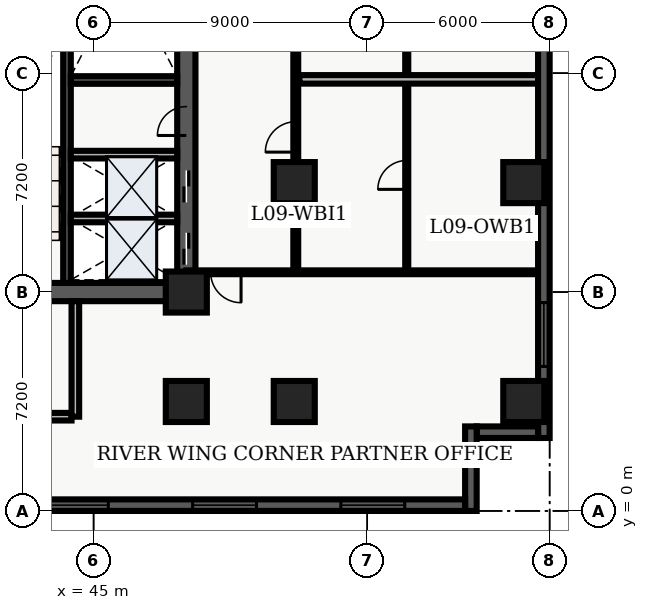
"""IFC4 building model, lengths in metres.
Left out: names, types, materials, properties, quantities, classifications, styles, units other than length and angle.
Written with IfcOpenShell. Run it as: python <this file> out.ifc"""

import sys

from ifc_helpers import new_model, entity, si_unit, converted_unit, direction, frame, origin_with_axes, origin_2d_with_axis, place, context, subcontext, project, spatial, polyline, rectangle, outline, extrude, element, fill, save


model = new_model("IFC4")
c1 = context("Model", 3, precision=1e-05, world=origin_with_axes(), true_north=direction((0.0, 1.0)))
c2 = subcontext(c1, "Body", "Model", "MODEL_VIEW")
j1 = project(units=[si_unit("LENGTHUNIT", "METRE"), converted_unit("PLANEANGLEUNIT", "DEGREE", entity("IfcPlaneAngleMeasure", 0.017), si_unit("PLANEANGLEUNIT", "RADIAN"), dimensions=[0, 0, 0, 0, 0, 0, 0])], contexts=[c1])
p1 = place(None, origin_with_axes())
s1 = spatial("IfcSite", under=j1, at=p1, CompositionType="ELEMENT")
p2 = place(p1, origin_with_axes())
s2 = spatial("IfcBuilding", under=s1, at=p2, CompositionType="ELEMENT")
p3 = place(p2, frame((0.0, 0.0, 40.5), z_axis=(0.0, 0.0, 1.0), x_axis=(1.0, 0.0, 0.0)))
s3 = spatial("IfcBuildingStorey", under=s2, at=p3, CompositionType="ELEMENT", Elevation=40.5)
p4 = place(p3, frame((40.2, 7.2, 0.0), z_axis=(0.0, 0.0, 1.0), x_axis=(1.0, 0.0, 0.0)))
e1 = element("IfcWall", 1, at=p4, inside=s3, PredefinedType="SHEAR", context=c2, shape_type="SweptSolid", body=[
    extrude(outline(polyline([(0.0, -0.3), (7.85, -0.3), (7.85, 0.3), (0.0, 0.3), (0.0, -0.3)])), origin_with_axes(), (0.0, 0.0, 1.0), 3.66),
])
p5 = place(p4, frame((2.175, 0.0, 0.0), z_axis=(0.0, 0.0, 1.0), x_axis=(1.0, 0.0, 0.0)))
e2 = element("IfcOpeningElement", 2, at=p5, cuts=e1, PredefinedType="OPENING", context=c2, shape_type="SweptSolid", body=[
    extrude(rectangle(XDim=1.05, YDim=0.62, at=origin_2d_with_axis()), origin_with_axes(), (0.0, 0.0, 1.0), 2.15),
])
p6 = place(p3, frame((48.05, 7.2, 0.0), z_axis=(0.0, 0.0, 1.0), x_axis=(0.0, 1.0, 0.0)))
e3 = element("IfcWall", 3, at=p6, inside=s3, PredefinedType="SHEAR", context=c2, shape_type="SweptSolid", body=[
    extrude(outline(polyline([(0.0, -0.3), (15.6, -0.3), (15.6, 0.3), (0.0, 0.3), (0.0, -0.3)])), origin_with_axes(), (0.0, 0.0, 1.0), 3.66),
])
p7 = place(p6, frame((1.425, 0.0, 0.0), z_axis=(0.0, 0.0, 1.0), x_axis=(1.0, 0.0, 0.0)))
e4 = element("IfcOpeningElement", 4, at=p7, cuts=e3, PredefinedType="OPENING", context=c2, shape_type="SweptSolid", body=[
    extrude(rectangle(XDim=1.05, YDim=0.62, at=origin_2d_with_axis()), origin_with_axes(), (0.0, 0.0, 1.0), 2.15),
])
p8 = place(p6, frame((3.475, 0.0, 0.0), z_axis=(0.0, 0.0, 1.0), x_axis=(1.0, 0.0, 0.0)))
e5 = element("IfcOpeningElement", 5, at=p8, cuts=e3, PredefinedType="OPENING", context=c2, shape_type="SweptSolid", body=[
    extrude(rectangle(XDim=1.05, YDim=0.62, at=origin_2d_with_axis()), origin_with_axes(), (0.0, 0.0, 1.0), 2.15),
])
p9 = place(p6, frame((5.625, 0.0, 0.0), z_axis=(0.0, 0.0, 1.0), x_axis=(1.0, 0.0, 0.0)))
e6 = element("IfcOpeningElement", 6, at=p9, cuts=e3, PredefinedType="OPENING", context=c2, shape_type="SweptSolid", body=[
    extrude(rectangle(XDim=0.95, YDim=0.62, at=origin_2d_with_axis()), origin_with_axes(), (0.0, 0.0, 1.0), 2.15),
])
p10 = place(p3, frame((44.125, 7.5, 0.0), z_axis=(0.0, 0.0, 1.0), x_axis=(0.0, 1.0, 0.0)))
e7 = element("IfcWall", 7, at=p10, inside=s3, PredefinedType="SHEAR", context=c2, shape_type="SweptSolid", body=[
    extrude(outline(polyline([(0.0, -0.125), (15.0, -0.125), (15.0, 0.125), (0.0, 0.125), (0.0, -0.125)])), origin_with_axes(), (0.0, 0.0, 1.0), 3.66),
])
p11 = place(p3, frame((44.25, 14.175, 0.0), z_axis=(0.0, 0.0, 1.0), x_axis=(1.0, 0.0, 0.0)))
e8 = element("IfcWall", 8, at=p11, inside=s3, PredefinedType="SHEAR", context=c2, shape_type="SweptSolid", body=[
    extrude(outline(polyline([(0.0, -0.125), (3.5, -0.125), (3.5, 0.125), (0.0, 0.125), (0.0, -0.125)])), origin_with_axes(), (0.0, 0.0, 1.0), 3.66),
])
p12 = place(p3, frame((40.325, 3.1, 0.0), z_axis=(0.0, 0.0, 1.0), x_axis=(1.0, 0.0, 0.0)))
e9 = element("IfcWall", 9, at=p12, inside=s3, PredefinedType="SOLIDWALL", context=c2, shape_type="SweptSolid", body=[
    extrude(outline(polyline([(0.0, -0.125), (3.95, -0.125), (3.95, 0.125), (0.0, 0.125), (0.0, -0.125)])), origin_with_axes(), (0.0, 0.0, 1.0), 2.7),
])
p13 = place(p3, frame((44.4, 3.1, 0.0), z_axis=(0.0, 0.0, 1.0), x_axis=(0.0, 1.0, 0.0)))
e10 = element("IfcWall", 10, at=p13, inside=s3, PredefinedType="SOLIDWALL", context=c2, shape_type="SweptSolid", body=[
    extrude(outline(polyline([(0.0, -0.125), (3.8, -0.125), (3.8, 0.125), (0.0, 0.125), (0.0, -0.125)])), origin_with_axes(), (0.0, 0.0, 1.0), 2.7),
])
for number, where, z_axis, x_axis in (
    (11, (48.05, 3.6, 0.0), (0.0, 0.0, 1.0), (1.0, 0.0, 0.0)),
    (12, (48.05, 7.2, 0.0), (0.0, 0.0, 1.0), (1.0, 0.0, 0.0)),
    (13, (51.6, 3.6, 0.0), (0.0, 0.0, 1.0), (1.0, 0.0, 0.0)),
    (14, (51.6, 10.8, 0.0), (0.0, 0.0, 1.0), (1.0, 0.0, 0.0)),
    (15, (59.15, 3.6, 0.0), (0.0, 0.0, 1.0), (1.0, 0.0, 0.0)),
    (16, (59.15, 10.8, 0.0), (0.0, 0.0, 1.0), (1.0, 0.0, 0.0)),
):
    element("IfcColumn", number, at=place(p3, frame(where, z_axis=z_axis, x_axis=x_axis)), inside=s3, PredefinedType="COLUMN", context=c2, shape_type="SweptSolid", body=[
        extrude(rectangle(XDim=1.35, YDim=1.35, at=origin_2d_with_axis()), origin_with_axes(), (0.0, 0.0, 1.0), 3.9),
    ])
for number, where, z_axis, x_axis in (
    (17, (44.25, 9.62, 0.0), (0.0, 0.0, 1.0), (1.0, 0.0, 0.0)),
    (18, (44.25, 11.72, 0.0), (0.0, 0.0, 1.0), (1.0, 0.0, 0.0)),
):
    element("IfcWall", number, at=place(p3, frame(where, z_axis=z_axis, x_axis=x_axis)), inside=s3, PredefinedType="SOLIDWALL", context=c2, shape_type="SweptSolid", body=[
        extrude(outline(polyline([(0.0, -0.125), (3.5, -0.125), (3.5, 0.125), (0.0, 0.125), (0.0, -0.125)])), origin_with_axes(), (0.0, 0.0, 1.0), 2.7),
    ])
p14 = place(p3, frame((51.65, 7.85, 0.0), z_axis=(0.0, 0.0, 1.0), x_axis=(0.0, 1.0, 0.0)))
e19 = element("IfcWall", 19, at=p14, inside=s3, PredefinedType="PARTITIONING", context=c2, shape_type="SweptSolid", body=[
    extrude(outline(polyline([(0.0, -0.08), (18.8, -0.08), (18.8, 0.08), (0.0, 0.08), (0.0, -0.08)])), origin_with_axes(), (0.0, 0.0, 1.0), 2.7),
])
p15 = place(p14, frame((4.453, 0.0, 0.0), z_axis=(0.0, 0.0, 1.0), x_axis=(1.0, 0.0, 0.0)))
e20 = element("IfcOpeningElement", 20, at=p15, cuts=e19, PredefinedType="OPENING", context=c2, shape_type="SweptSolid", body=[
    extrude(rectangle(XDim=1.0, YDim=0.18, at=origin_2d_with_axis()), origin_with_axes(), (0.0, 0.0, 1.0), 2.15),
])
p16 = place(p14, frame((7.831, 0.0, 0.0), z_axis=(0.0, 0.0, 1.0), x_axis=(1.0, 0.0, 0.0)))
e21 = element("IfcOpeningElement", 21, at=p16, cuts=e19, PredefinedType="OPENING", context=c2, shape_type="SweptSolid", body=[
    extrude(rectangle(XDim=1.0, YDim=0.18, at=origin_2d_with_axis()), origin_with_axes(), (0.0, 0.0, 1.0), 2.15),
])
p17 = place(p14, frame((11.898, 0.0, 0.0), z_axis=(0.0, 0.0, 1.0), x_axis=(1.0, 0.0, 0.0)))
e22 = element("IfcOpeningElement", 22, at=p17, cuts=e19, PredefinedType="OPENING", context=c2, shape_type="SweptSolid", body=[
    extrude(rectangle(XDim=1.0, YDim=0.18, at=origin_2d_with_axis()), origin_with_axes(), (0.0, 0.0, 1.0), 2.15),
])
p18 = place(p14, frame((17.98, 0.0, 0.0), z_axis=(0.0, 0.0, 1.0), x_axis=(1.0, 0.0, 0.0)))
e23 = element("IfcOpeningElement", 23, at=p18, cuts=e19, PredefinedType="OPENING", context=c2, shape_type="SweptSolid", body=[
    extrude(rectangle(XDim=1.0, YDim=0.18, at=origin_2d_with_axis()), origin_with_axes(), (0.0, 0.0, 1.0), 2.15),
])
p19 = place(p3, frame((59.64, 7.85, 0.0), z_axis=(0.0, 0.0, 1.0), x_axis=(-1.0, 0.0, 0.0)))
e24 = element("IfcWall", 24, at=p19, inside=s3, PredefinedType="PARTITIONING", context=c2, shape_type="SweptSolid", body=[
    extrude(outline(polyline([(0.0, -0.062), (11.59, -0.062), (11.59, 0.062), (0.0, 0.062), (0.0, -0.062)])), origin_with_axes(), (0.0, 0.0, 1.0), 2.7),
])
p20 = place(p19, frame((10.29, 0.0, 0.0), z_axis=(0.0, 0.0, 1.0), x_axis=(1.0, 0.0, 0.0)))
e25 = element("IfcOpeningElement", 25, at=p20, cuts=e24, PredefinedType="OPENING", context=c2, shape_type="SweptSolid", body=[
    extrude(rectangle(XDim=1.0, YDim=0.145, at=origin_2d_with_axis()), origin_with_axes(), (0.0, 0.0, 1.0), 2.15),
])
p21 = place(p3, frame((55.3, 7.98, 0.0), z_axis=(0.0, 0.0, 1.0), x_axis=(0.0, 1.0, 0.0)))
e26 = element("IfcWall", 26, at=p21, inside=s3, PredefinedType="PARTITIONING", context=c2, shape_type="SweptSolid", body=[
    extrude(outline(polyline([(0.0, -0.05), (18.54, -0.05), (18.54, 0.05), (0.0, 0.05), (0.0, -0.05)])), origin_with_axes(), (0.0, 0.0, 1.0), 2.7),
])
p22 = place(p21, frame((3.073, 0.0, 0.0), z_axis=(0.0, 0.0, 1.0), x_axis=(1.0, 0.0, 0.0)))
e27 = element("IfcOpeningElement", 27, at=p22, cuts=e26, PredefinedType="OPENING", context=c2, shape_type="SweptSolid", body=[
    extrude(rectangle(XDim=0.95, YDim=0.12, at=origin_2d_with_axis()), origin_with_axes(), (0.0, 0.0, 1.0), 2.15),
])
p23 = place(p21, frame((7.981, 0.0, 0.0), z_axis=(0.0, 0.0, 1.0), x_axis=(1.0, 0.0, 0.0)))
e28 = element("IfcOpeningElement", 28, at=p23, cuts=e26, PredefinedType="OPENING", context=c2, shape_type="SweptSolid", body=[
    extrude(rectangle(XDim=0.95, YDim=0.12, at=origin_2d_with_axis()), origin_with_axes(), (0.0, 0.0, 1.0), 2.15),
])
p24 = place(p21, frame((11.768, 0.0, 0.0), z_axis=(0.0, 0.0, 1.0), x_axis=(1.0, 0.0, 0.0)))
e29 = element("IfcOpeningElement", 29, at=p24, cuts=e26, PredefinedType="OPENING", context=c2, shape_type="SweptSolid", body=[
    extrude(rectangle(XDim=0.95, YDim=0.12, at=origin_2d_with_axis()), origin_with_axes(), (0.0, 0.0, 1.0), 2.15),
])
p25 = place(p21, frame((16.201, 0.0, 0.0), z_axis=(0.0, 0.0, 1.0), x_axis=(1.0, 0.0, 0.0)))
e30 = element("IfcOpeningElement", 30, at=p25, cuts=e26, PredefinedType="OPENING", context=c2, shape_type="SweptSolid", body=[
    extrude(rectangle(XDim=0.95, YDim=0.12, at=origin_2d_with_axis()), origin_with_axes(), (0.0, 0.0, 1.0), 2.15),
])
p26 = place(p3, frame((51.77, 14.196, 0.0), z_axis=(0.0, 0.0, 1.0), x_axis=(1.0, 0.0, 0.0)))
e31 = element("IfcWall", 31, at=p26, inside=s3, PredefinedType="PARTITIONING", context=c2, shape_type="SweptSolid", body=[
    extrude(outline(polyline([(0.0, -0.14), (7.855, -0.14), (7.855, 0.14), (0.0, 0.14), (0.0, -0.14)])), origin_with_axes(), (0.0, 0.0, 1.0), 2.7),
])
p27 = place(p3, frame((59.81, 26.02, 0.0), z_axis=(0.0, 0.0, 1.0), x_axis=(0.0, -1.0, 0.0)))
e32 = element("IfcWall", 32, at=p27, inside=s3, PredefinedType="SOLIDWALL", context=c2, shape_type="SweptSolid", body=[
    extrude(outline(polyline([(0.0, -0.19), (23.62, -0.19), (23.62, 0.19), (0.0, 0.19), (0.0, -0.19)])), origin_with_axes(), (0.0, 0.0, 1.0), 3.66),
])
p28 = place(p27, frame((20.218, 0.0, 0.45), z_axis=(0.0, 0.0, 1.0), x_axis=(1.0, 0.0, 0.0)))
e33 = element("IfcOpeningElement", 33, at=p28, cuts=e32, PredefinedType="OPENING", context=c2, shape_type="SweptSolid", body=[
    extrude(rectangle(XDim=2.1, YDim=0.4, at=origin_2d_with_axis()), origin_with_axes(), (0.0, 0.0, 1.0), 2.2),
])
p29 = place(p3, frame((59.62, 2.59, 0.0), z_axis=(0.0, 0.0, 1.0), x_axis=(-1.0, 0.0, 0.0)))
e34 = element("IfcWall", 34, at=p29, inside=s3, PredefinedType="SOLIDWALL", context=c2, shape_type="SweptSolid", body=[
    extrude(outline(polyline([(0.0, -0.19), (2.02, -0.19), (2.02, 0.19), (0.0, 0.19), (0.0, -0.19)])), origin_with_axes(), (0.0, 0.0, 1.0), 3.66),
])
p30 = place(p3, frame((57.41, 2.78, 0.0), z_axis=(0.0, 0.0, 1.0), x_axis=(0.0, -1.0, 0.0)))
e35 = element("IfcWall", 35, at=p30, inside=s3, PredefinedType="SOLIDWALL", context=c2, shape_type="SweptSolid", body=[
    extrude(outline(polyline([(0.0, -0.19), (2.78, -0.19), (2.78, 0.19), (0.0, 0.19), (0.0, -0.19)])), origin_with_axes(), (0.0, 0.0, 1.0), 3.66),
])
p31 = place(p3, frame((57.22, 0.19, 0.0), z_axis=(0.0, 0.0, 1.0), x_axis=(-1.0, 0.0, 0.0)))
e36 = element("IfcWall", 36, at=p31, inside=s3, PredefinedType="SOLIDWALL", context=c2, shape_type="SweptSolid", body=[
    extrude(outline(polyline([(0.0, -0.19), (54.82, -0.19), (54.82, 0.19), (0.0, 0.19), (0.0, -0.19)])), origin_with_axes(), (0.0, 0.0, 1.0), 3.66),
])
p32 = place(p31, frame((3.037, 0.0, 0.45), z_axis=(0.0, 0.0, 1.0), x_axis=(1.0, 0.0, 0.0)))
e37 = element("IfcOpeningElement", 37, at=p32, cuts=e36, PredefinedType="OPENING", context=c2, shape_type="SweptSolid", body=[
    extrude(rectangle(XDim=2.1, YDim=0.4, at=origin_2d_with_axis()), origin_with_axes(), (0.0, 0.0, 1.0), 2.2),
])
p33 = place(p31, frame((7.912, 0.0, 0.45), z_axis=(0.0, 0.0, 1.0), x_axis=(1.0, 0.0, 0.0)))
e38 = element("IfcOpeningElement", 38, at=p33, cuts=e36, PredefinedType="OPENING", context=c2, shape_type="SweptSolid", body=[
    extrude(rectangle(XDim=2.1, YDim=0.4, at=origin_2d_with_axis()), origin_with_axes(), (0.0, 0.0, 1.0), 2.2),
])
p34 = place(p31, frame((12.786, 0.0, 0.45), z_axis=(0.0, 0.0, 1.0), x_axis=(1.0, 0.0, 0.0)))
e39 = element("IfcOpeningElement", 39, at=p34, cuts=e36, PredefinedType="OPENING", context=c2, shape_type="SweptSolid", body=[
    extrude(rectangle(XDim=2.1, YDim=0.4, at=origin_2d_with_axis()), origin_with_axes(), (0.0, 0.0, 1.0), 2.2),
])
p35 = place(p31, frame((17.661, 0.0, 0.45), z_axis=(0.0, 0.0, 1.0), x_axis=(1.0, 0.0, 0.0)))
e40 = element("IfcOpeningElement", 40, at=p35, cuts=e36, PredefinedType="OPENING", context=c2, shape_type="SweptSolid", body=[
    extrude(rectangle(XDim=2.1, YDim=0.4, at=origin_2d_with_axis()), origin_with_axes(), (0.0, 0.0, 1.0), 2.2),
])
p36 = place(p31, frame((22.535, 0.0, 0.45), z_axis=(0.0, 0.0, 1.0), x_axis=(1.0, 0.0, 0.0)))
e41 = element("IfcOpeningElement", 41, at=p36, cuts=e36, PredefinedType="OPENING", context=c2, shape_type="SweptSolid", body=[
    extrude(rectangle(XDim=2.1, YDim=0.4, at=origin_2d_with_axis()), origin_with_axes(), (0.0, 0.0, 1.0), 2.2),
])
p37 = place(p31, frame((27.41, 0.0, 0.45), z_axis=(0.0, 0.0, 1.0), x_axis=(1.0, 0.0, 0.0)))
e42 = element("IfcOpeningElement", 42, at=p37, cuts=e36, PredefinedType="OPENING", context=c2, shape_type="SweptSolid", body=[
    extrude(rectangle(XDim=2.1, YDim=0.4, at=origin_2d_with_axis()), origin_with_axes(), (0.0, 0.0, 1.0), 2.2),
])
p38 = place(p31, frame((32.285, 0.0, 0.45), z_axis=(0.0, 0.0, 1.0), x_axis=(1.0, 0.0, 0.0)))
e43 = element("IfcOpeningElement", 43, at=p38, cuts=e36, PredefinedType="OPENING", context=c2, shape_type="SweptSolid", body=[
    extrude(rectangle(XDim=2.1, YDim=0.4, at=origin_2d_with_axis()), origin_with_axes(), (0.0, 0.0, 1.0), 2.2),
])
p39 = place(p31, frame((37.159, 0.0, 0.45), z_axis=(0.0, 0.0, 1.0), x_axis=(1.0, 0.0, 0.0)))
e44 = element("IfcOpeningElement", 44, at=p39, cuts=e36, PredefinedType="OPENING", context=c2, shape_type="SweptSolid", body=[
    extrude(rectangle(XDim=2.1, YDim=0.4, at=origin_2d_with_axis()), origin_with_axes(), (0.0, 0.0, 1.0), 2.2),
])
p40 = place(p31, frame((41.584, 0.0, 0.45), z_axis=(0.0, 0.0, 1.0), x_axis=(1.0, 0.0, 0.0)))
e45 = element("IfcOpeningElement", 45, at=p40, cuts=e36, PredefinedType="OPENING", context=c2, shape_type="SweptSolid", body=[
    extrude(rectangle(XDim=2.1, YDim=0.4, at=origin_2d_with_axis()), origin_with_axes(), (0.0, 0.0, 1.0), 2.2),
])
p41 = place(p31, frame((46.908, 0.0, 0.45), z_axis=(0.0, 0.0, 1.0), x_axis=(1.0, 0.0, 0.0)))
e46 = element("IfcOpeningElement", 46, at=p41, cuts=e36, PredefinedType="OPENING", context=c2, shape_type="SweptSolid", body=[
    extrude(rectangle(XDim=2.1, YDim=0.4, at=origin_2d_with_axis()), origin_with_axes(), (0.0, 0.0, 1.0), 2.2),
])
p42 = place(p31, frame((51.783, 0.0, 0.45), z_axis=(0.0, 0.0, 1.0), x_axis=(1.0, 0.0, 0.0)))
e47 = element("IfcOpeningElement", 47, at=p42, cuts=e36, PredefinedType="OPENING", context=c2, shape_type="SweptSolid", body=[
    extrude(rectangle(XDim=2.1, YDim=0.4, at=origin_2d_with_axis()), origin_with_axes(), (0.0, 0.0, 1.0), 2.2),
])
p43 = place(p6, frame((1.425, 0.0, 0.0), z_axis=(0.0, 0.0, 1.0), x_axis=(1.0, 0.0, 0.0)))
e48 = element("IfcDoor", 48, at=p43, inside=s3, OperationType="SLIDING_TO_LEFT", PredefinedType="DOOR", context=c2, shape_type="SweptSolid", body=[
    extrude(rectangle(XDim=1.05, YDim=0.09, at=origin_2d_with_axis()), origin_with_axes(), (0.0, 0.0, 1.0), 2.15),
])
fill(e4, e48)
p44 = place(p6, frame((3.475, 0.0, 0.0), z_axis=(0.0, 0.0, 1.0), x_axis=(1.0, 0.0, 0.0)))
e49 = element("IfcDoor", 49, at=p44, inside=s3, OperationType="SLIDING_TO_RIGHT", PredefinedType="DOOR", context=c2, shape_type="SweptSolid", body=[
    extrude(rectangle(XDim=1.05, YDim=0.09, at=origin_2d_with_axis()), origin_with_axes(), (0.0, 0.0, 1.0), 2.15),
])
fill(e5, e49)
p45 = place(p6, frame((5.625, 0.0, 0.0), z_axis=(0.0, 0.0, 1.0), x_axis=(1.0, 0.0, 0.0)))
e50 = element("IfcDoor", 50, at=p45, inside=s3, OperationType="SINGLE_SWING_LEFT", PredefinedType="DOOR", context=c2, shape_type="SweptSolid", body=[
    extrude(rectangle(XDim=0.95, YDim=0.09, at=origin_2d_with_axis()), origin_with_axes(), (0.0, 0.0, 1.0), 2.15),
])
fill(e6, e50)
p46 = place(p19, frame((10.29, 0.0, 0.0), z_axis=(0.0, 0.0, 1.0), x_axis=(1.0, 0.0, 0.0)))
e51 = element("IfcDoor", 51, at=p46, inside=s3, OperationType="SINGLE_SWING_LEFT", PredefinedType="DOOR", context=c2, shape_type="SweptSolid", body=[
    extrude(rectangle(XDim=1.0, YDim=0.075, at=origin_2d_with_axis()), origin_with_axes(), (0.0, 0.0, 1.0), 2.15),
])
fill(e25, e51)
p47 = place(p21, frame((3.073, 0.0, 0.0), z_axis=(0.0, 0.0, 1.0), x_axis=(1.0, 0.0, 0.0)))
e52 = element("IfcDoor", 52, at=p47, inside=s3, OperationType="SINGLE_SWING_LEFT", PredefinedType="DOOR", context=c2, shape_type="SweptSolid", body=[
    extrude(rectangle(XDim=0.95, YDim=0.06, at=origin_2d_with_axis()), origin_with_axes(), (0.0, 0.0, 1.0), 2.15),
])
fill(e27, e52)
p48 = place(p14, frame((4.453, 0.0, 0.0), z_axis=(0.0, 0.0, 1.0), x_axis=(1.0, 0.0, 0.0)))
e53 = element("IfcDoor", 53, at=p48, inside=s3, OperationType="SINGLE_SWING_LEFT", PredefinedType="DOOR", context=c2, shape_type="SweptSolid", body=[
    extrude(rectangle(XDim=1.0, YDim=0.09, at=origin_2d_with_axis()), origin_with_axes(), (0.0, 0.0, 1.0), 2.15),
])
fill(e20, e53)
p49 = place(p27, frame((20.218, 0.0, 0.45), z_axis=(0.0, 0.0, 1.0), x_axis=(1.0, 0.0, 0.0)))
e54 = element("IfcWindow", 54, at=p49, inside=s3, PredefinedType="WINDOW", context=c2, shape_type="SweptSolid", body=[
    extrude(rectangle(XDim=2.1, YDim=0.09, at=origin_2d_with_axis()), origin_with_axes(), (0.0, 0.0, 1.0), 2.2),
])
fill(e33, e54)
p50 = place(p31, frame((3.037, 0.0, 0.45), z_axis=(0.0, 0.0, 1.0), x_axis=(1.0, 0.0, 0.0)))
e55 = element("IfcWindow", 55, at=p50, inside=s3, PredefinedType="WINDOW", context=c2, shape_type="SweptSolid", body=[
    extrude(rectangle(XDim=2.1, YDim=0.09, at=origin_2d_with_axis()), origin_with_axes(), (0.0, 0.0, 1.0), 2.2),
])
fill(e37, e55)
p51 = place(p31, frame((7.912, 0.0, 0.45), z_axis=(0.0, 0.0, 1.0), x_axis=(1.0, 0.0, 0.0)))
e56 = element("IfcWindow", 56, at=p51, inside=s3, PredefinedType="WINDOW", context=c2, shape_type="SweptSolid", body=[
    extrude(rectangle(XDim=2.1, YDim=0.09, at=origin_2d_with_axis()), origin_with_axes(), (0.0, 0.0, 1.0), 2.2),
])
fill(e38, e56)
p52 = place(p31, frame((12.786, 0.0, 0.45), z_axis=(0.0, 0.0, 1.0), x_axis=(1.0, 0.0, 0.0)))
e57 = element("IfcWindow", 57, at=p52, inside=s3, PredefinedType="WINDOW", context=c2, shape_type="SweptSolid", body=[
    extrude(rectangle(XDim=2.1, YDim=0.09, at=origin_2d_with_axis()), origin_with_axes(), (0.0, 0.0, 1.0), 2.2),
])
fill(e39, e57)
save(model, sys.argv[1])
